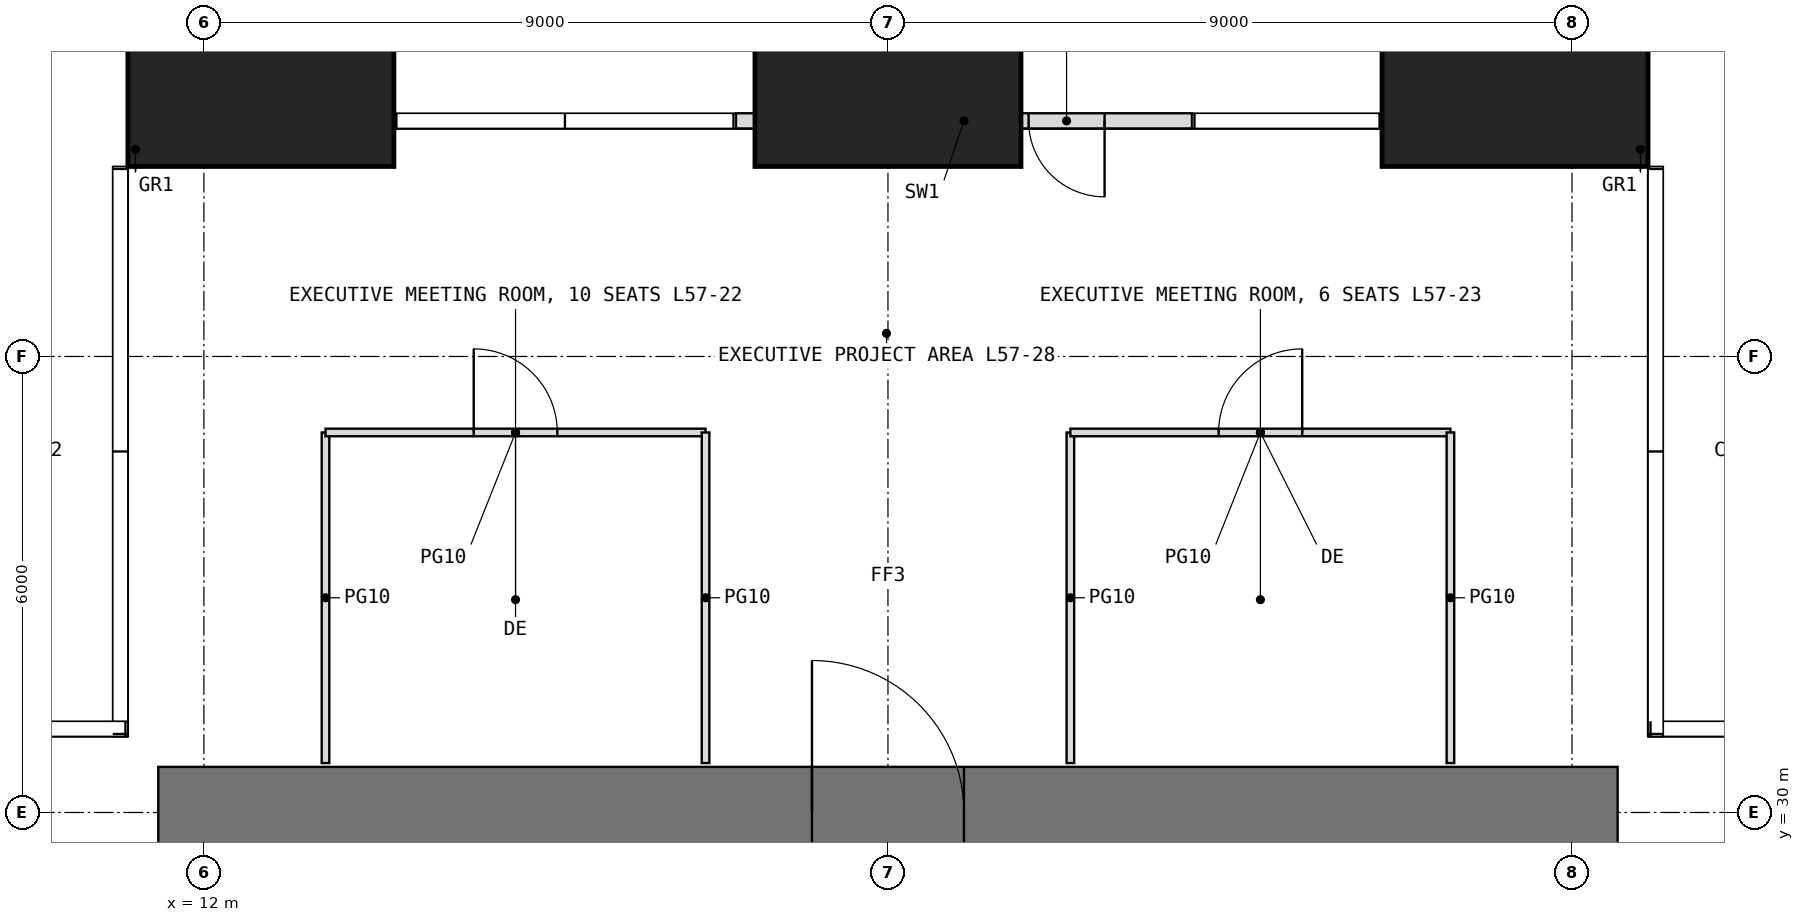
"""IFC4 building model, lengths in metres.
Left out: names, types, materials, properties, quantities, classifications, styles, units other than length and angle.
Written with IfcOpenShell. Run it as: python <this file> out.ifc"""

import sys

from ifc_helpers import new_model, si_unit, direction, frame, frame_2d, origin, origin_2d, place, context, subcontext, project, spatial, rectangle, extrude, element, fill, save


model = new_model("IFC4")
c1 = context("Model", 3, precision=1e-05, world=origin(), true_north=direction((0.0, 1.0)))
c2 = subcontext(c1, "Body", "Model", "MODEL_VIEW")
j1 = project(units=[si_unit("LENGTHUNIT", "METRE"), si_unit("PLANEANGLEUNIT", "RADIAN")], contexts=[c1])
p1 = place(None, origin())
s1 = spatial("IfcSite", under=j1, at=p1, CompositionType="ELEMENT")
p2 = place(p1, origin())
s2 = spatial("IfcBuilding", under=s1, at=p2, CompositionType="ELEMENT")
p3 = place(p2, frame((0.0, 0.0, 239.5)))
s3 = spatial("IfcBuildingStorey", under=s2, at=p3, CompositionType="ELEMENT", Elevation=239.5)
for number, where, z_axis, x_axis in (
    (1, (12.75, 40.25, 0.0), (0.0, 0.0, 1.0), (1.0, 0.0, 0.0)),
    (2, (21.0, 40.25, 0.0), (0.0, 0.0, 1.0), (1.0, 0.0, 0.0)),
    (3, (29.25, 40.25, 0.0), (0.0, 0.0, 1.0), (1.0, 0.0, 0.0)),
):
    element("IfcColumn", number, at=place(p3, frame(where, z_axis=z_axis, x_axis=x_axis)), inside=s3, PredefinedType="COLUMN", context=c2, shape_type="SweptSolid", body=[
        extrude(rectangle(XDim=3.5, YDim=3.5, at=origin_2d()), origin(), (0.0, 0.0, 1.0), 4.5),
    ])
p4 = place(p3, frame((25.0, 39.1, 0.0), z_axis=(0.0, 0.0, 1.0), x_axis=(-1.0, 0.0, 0.0)))
e4 = element("IfcWall", 4, at=p4, inside=s3, PredefinedType="USERDEFINED", context=c2, shape_type="SweptSolid", body=[
    extrude(rectangle(XDim=6.0, YDim=0.2, at=frame_2d((3.0, 0.0))), origin(), (0.0, 0.0, 1.0), 4.25),
])
p5 = place(p4, frame((1.15, 0.0, 0.0)))
e5 = element("IfcOpeningElement", 5, at=p5, cuts=e4, PredefinedType="OPENING", context=c2, shape_type="SweptSolid", body=[
    extrude(rectangle(XDim=1.0, YDim=2.4, at=frame_2d((0.5, 1.2))), frame((0.0, 0.11, 0.0), z_axis=(0.0, -1.0, 0.0), x_axis=(1.0, 0.0, 0.0)), (0.0, 0.0, 1.0), 0.22),
])
p6 = place(p3, frame((11.4, 30.0, -0.05), z_axis=(0.0, 0.0, 1.0), x_axis=(1.0, 0.0, 0.0)))
e6 = element("IfcWall", 6, at=p6, inside=s3, PredefinedType="SHEAR", context=c2, shape_type="SweptSolid", body=[
    extrude(rectangle(XDim=19.2, YDim=1.2, at=frame_2d((9.6, 0.0))), origin(), (0.0, 0.0, 1.0), 4.5),
])
p7 = place(p6, frame((8.6, 0.0, 0.05)))
e7 = element("IfcOpeningElement", 7, at=p7, cuts=e6, PredefinedType="OPENING", context=c2, shape_type="SweptSolid", body=[
    extrude(rectangle(XDim=2.0, YDim=2.2, at=frame_2d((1.0, 1.1))), frame((0.0, 0.61, 0.0), z_axis=(0.0, -1.0, 0.0), x_axis=(1.0, 0.0, 0.0)), (0.0, 0.0, 1.0), 1.22),
])
p8 = place(p3, frame((13.6, 30.65, 0.0), z_axis=(0.0, 0.0, 1.0), x_axis=(0.0, 1.0, 0.0)))
e8 = element("IfcWall", 8, at=p8, inside=s3, PredefinedType="PARTITIONING", context=c2, shape_type="SweptSolid", body=[
    extrude(rectangle(XDim=4.35, YDim=0.1, at=frame_2d((2.175, 0.0))), origin(), (0.0, 0.0, 1.0), 4.25),
])
p9 = place(p3, frame((13.6, 35.0, 0.0), z_axis=(0.0, 0.0, 1.0), x_axis=(1.0, 0.0, 0.0)))
e9 = element("IfcWall", 9, at=p9, inside=s3, PredefinedType="PARTITIONING", context=c2, shape_type="SweptSolid", body=[
    extrude(rectangle(XDim=5.0, YDim=0.1, at=frame_2d((2.5, 0.0))), origin(), (0.0, 0.0, 1.0), 4.25),
])
p10 = place(p9, frame((1.95, 0.0, 0.0)))
e10 = element("IfcOpeningElement", 10, at=p10, cuts=e9, PredefinedType="OPENING", context=c2, shape_type="SweptSolid", body=[
    extrude(rectangle(XDim=1.1, YDim=2.3, at=frame_2d((0.55, 1.15))), frame((0.0, 0.06, 0.0), z_axis=(0.0, -1.0, 0.0), x_axis=(1.0, 0.0, 0.0)), (0.0, 0.0, 1.0), 0.12),
])
for number, where, z_axis, x_axis in (
    (11, (18.6, 30.65, 0.0), (0.0, 0.0, 1.0), (0.0, 1.0, 0.0)),
    (12, (23.4, 30.65, 0.0), (0.0, 0.0, 1.0), (0.0, 1.0, 0.0)),
):
    element("IfcWall", number, at=place(p3, frame(where, z_axis=z_axis, x_axis=x_axis)), inside=s3, PredefinedType="PARTITIONING", context=c2, shape_type="SweptSolid", body=[
        extrude(rectangle(XDim=4.35, YDim=0.1, at=frame_2d((2.175, 0.0))), origin(), (0.0, 0.0, 1.0), 4.25),
    ])
p11 = place(p3, frame((23.4, 35.0, 0.0), z_axis=(0.0, 0.0, 1.0), x_axis=(1.0, 0.0, 0.0)))
e13 = element("IfcWall", 13, at=p11, inside=s3, PredefinedType="PARTITIONING", context=c2, shape_type="SweptSolid", body=[
    extrude(rectangle(XDim=5.0, YDim=0.1, at=frame_2d((2.5, 0.0))), origin(), (0.0, 0.0, 1.0), 4.25),
])
p12 = place(p11, frame((1.95, 0.0, 0.0)))
e14 = element("IfcOpeningElement", 14, at=p12, cuts=e13, PredefinedType="OPENING", context=c2, shape_type="SweptSolid", body=[
    extrude(rectangle(XDim=1.1, YDim=2.3, at=frame_2d((0.55, 1.15))), frame((0.0, 0.06, 0.0), z_axis=(0.0, -1.0, 0.0), x_axis=(1.0, 0.0, 0.0)), (0.0, 0.0, 1.0), 0.12),
])
p13 = place(p3, frame((28.4, 30.65, 0.0), z_axis=(0.0, 0.0, 1.0), x_axis=(0.0, 1.0, 0.0)))
e15 = element("IfcWall", 15, at=p13, inside=s3, PredefinedType="PARTITIONING", context=c2, shape_type="SweptSolid", body=[
    extrude(rectangle(XDim=4.35, YDim=0.1, at=frame_2d((2.175, 0.0))), origin(), (0.0, 0.0, 1.0), 4.25),
])
p14 = place(p5, origin())
e16 = element("IfcDoor", 16, at=p14, inside=s3, OperationType="SINGLE_SWING_LEFT", PredefinedType="DOOR", context=c2, shape_type="SweptSolid", body=[
    extrude(rectangle(XDim=1.0, YDim=2.4, at=frame_2d((0.5, 1.2))), frame((0.0, 0.025, 0.0), z_axis=(0.0, -1.0, 0.0), x_axis=(1.0, 0.0, 0.0)), (0.0, 0.0, 1.0), 0.05),
])
fill(e5, e16)
p15 = place(p7, origin())
e17 = element("IfcDoor", 17, at=p15, inside=s3, OperationType="DOUBLE_DOOR_SINGLE_SWING", PredefinedType="DOOR", context=c2, shape_type="SweptSolid", body=[
    extrude(rectangle(XDim=2.0, YDim=2.2, at=frame_2d((1.0, 1.1))), frame((0.0, 0.025, 0.0), z_axis=(0.0, -1.0, 0.0), x_axis=(1.0, 0.0, 0.0)), (0.0, 0.0, 1.0), 0.05),
])
fill(e7, e17)
p16 = place(p10, origin())
e18 = element("IfcDoor", 18, at=p16, inside=s3, OperationType="SINGLE_SWING_LEFT", PredefinedType="DOOR", context=c2, shape_type="SweptSolid", body=[
    extrude(rectangle(XDim=1.1, YDim=2.3, at=frame_2d((0.55, 1.15))), frame((0.0, 0.025, 0.0), z_axis=(0.0, -1.0, 0.0), x_axis=(1.0, 0.0, 0.0)), (0.0, 0.0, 1.0), 0.05),
])
fill(e10, e18)
p17 = place(p12, origin())
e19 = element("IfcDoor", 19, at=p17, inside=s3, OperationType="SINGLE_SWING_RIGHT", PredefinedType="DOOR", context=c2, shape_type="SweptSolid", body=[
    extrude(rectangle(XDim=1.1, YDim=2.3, at=frame_2d((0.55, 1.15))), frame((0.0, 0.025, 0.0), z_axis=(0.0, -1.0, 0.0), x_axis=(1.0, 0.0, 0.0)), (0.0, 0.0, 1.0), 0.05),
])
fill(e14, e19)
save(model, sys.argv[1])
